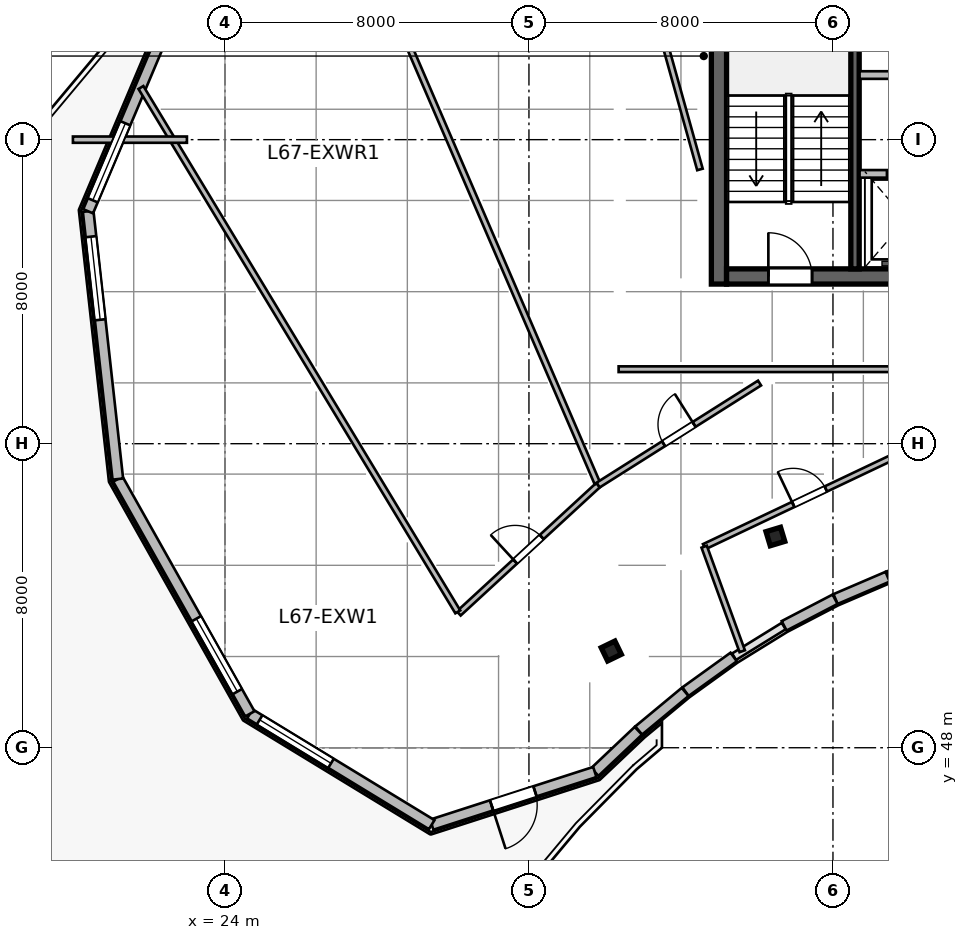
"""IFC4 building model, lengths in metres.
Left out: names, types, materials, properties, quantities, classifications, styles, units other than length and angle.
Written with IfcOpenShell. Run it as: python <this file> out.ifc"""

import sys

from ifc_helpers import new_model, si_unit, direction, frame, frame_2d, origin, origin_2d, place, context, subcontext, project, spatial, rectangle, i_section, extrude, source, transform, mapped, element, fill, save


model = new_model("IFC4")
c1 = context("Model", 3, precision=1e-05, world=origin(), true_north=direction((0.0, 1.0)))
c2 = subcontext(c1, "Body", "Model", "MODEL_VIEW")
j1 = project(units=[si_unit("LENGTHUNIT", "METRE"), si_unit("PLANEANGLEUNIT", "RADIAN")], contexts=[c1])
p1 = place(None, origin())
s1 = spatial("IfcSite", under=j1, at=p1, CompositionType="ELEMENT")
p2 = place(p1, origin())
s2 = spatial("IfcBuilding", under=s1, at=p2, CompositionType="ELEMENT")
p3 = place(p2, frame((0.0, 0.0, 275.7)))
s3 = spatial("IfcBuildingStorey", under=s2, at=p3, CompositionType="ELEMENT", Elevation=275.7)
m1 = source(origin(), c2, "Body", "SweptSolid", [
    extrude(rectangle(XDim=12.0, YDim=0.4, at=frame_2d((6.0, 0.0))), origin(), (0.0, 0.0, 1.0), 3.9),
])
p4 = place(p3, frame((37.0, 60.2, 0.0), z_axis=(0.0, 0.0, 1.0), x_axis=(0.0, 1.0, 0.0)))
e1 = element("IfcWall", 1, at=p4, inside=s3, PredefinedType="SHEAR", context=c2, shape_type="MappedRepresentation", body=[
    mapped(m1, transform((0.0, 0.0, 0.0), scale=1.0)),
])
m2 = source(origin(), c2, "Body", "SweptSolid", [
    extrude(rectangle(XDim=21.6, YDim=0.4, at=frame_2d((10.8, 0.0))), origin(), (0.0, 0.0, 1.0), 3.9),
])
p5 = place(p3, frame((37.2, 60.4, 0.0), z_axis=(0.0, 0.0, 1.0), x_axis=(1.0, 0.0, 0.0)))
e2 = element("IfcWall", 2, at=p5, inside=s3, PredefinedType="SHEAR", context=c2, shape_type="MappedRepresentation", body=[
    mapped(m2, transform((0.0, 0.0, 0.0), scale=1.0)),
])
p6 = place(p5, frame((1.1, 0.0, 0.0)))
e3 = element("IfcOpeningElement", 3, at=p6, cuts=e2, PredefinedType="OPENING", context=c2, shape_type="SweptSolid", body=[
    extrude(rectangle(XDim=1.15, YDim=2.15, at=frame_2d((0.575, 1.075))), frame((0.0, 0.21, 0.0), z_axis=(0.0, -1.0, 0.0), x_axis=(1.0, 0.0, 0.0)), (0.0, 0.0, 1.0), 0.42),
])
p7 = place(p5, frame((19.5, 0.0, 0.0)))
e4 = element("IfcOpeningElement", 4, at=p7, cuts=e2, PredefinedType="OPENING", context=c2, shape_type="SweptSolid", body=[
    extrude(rectangle(XDim=0.9, YDim=2.1, at=frame_2d((0.45, 1.05))), frame((0.0, 0.21, 0.0), z_axis=(0.0, -1.0, 0.0), x_axis=(1.0, 0.0, 0.0)), (0.0, 0.0, 1.0), 0.42),
])
p8 = place(p5, frame((12.02, 0.0, 0.0)))
e5 = element("IfcOpeningElement", 5, at=p8, cuts=e2, PredefinedType="OPENING", context=c2, shape_type="SweptSolid", body=[
    extrude(rectangle(XDim=1.6, YDim=2.15, at=frame_2d((0.8, 1.075))), frame((0.0, 0.21, 0.0), z_axis=(0.0, -1.0, 0.0), x_axis=(1.0, 0.0, 0.0)), (0.0, 0.0, 1.0), 0.42),
])
m3 = source(origin(), c2, "Body", "SweptSolid", [
    extrude(rectangle(XDim=11.2, YDim=0.22, at=frame_2d((5.6, 0.0))), origin(), (0.0, 0.0, 1.0), 3.9),
])
p9 = place(p3, frame((40.58, 60.6, 0.0), z_axis=(0.0, 0.0, 1.0), x_axis=(0.0, 1.0, 0.0)))
e6 = element("IfcWall", 6, at=p9, inside=s3, PredefinedType="SHEAR", context=c2, shape_type="MappedRepresentation", body=[
    mapped(m3, transform((0.0, 0.0, 0.0), scale=1.0)),
])
m4 = source(origin(), c2, "Body", "SweptSolid", [
    extrude(i_section(OverallWidth=0.399, OverallDepth=0.387, WebThickness=0.021, FlangeThickness=0.033, at=origin_2d()), origin(), (0.0, 0.0, 1.0), 3.9),
])
for number, where, z_axis, x_axis in (
    (7, (34.166, 50.545, 0.0), (0.0, 0.0, 1.0), (-0.436, 0.9, 0.0)),
    (8, (38.485, 53.558, 0.0), (0.0, 0.0, 1.0), (-0.289, 0.957, 0.0)),
):
    element("IfcColumn", number, at=place(p3, frame(where, z_axis=z_axis, x_axis=x_axis)), inside=s3, PredefinedType="COLUMN", context=c2, shape_type="MappedRepresentation", body=[
        mapped(m4, transform((0.0, 0.0, 0.0), scale=1.0)),
    ])
m5 = source(origin(), c2, "Body", "SweptSolid", [
    extrude(rectangle(XDim=1.473, YDim=0.28, at=frame_2d((0.736, 0.0))), origin(), (0.0, 0.0, 1.0), 3.64),
])
p10 = place(p3, frame((42.845, 52.979, 0.0), z_axis=(0.0, 0.0, 1.0), x_axis=(-0.946641296917, -0.322289086026, 0.0)))
e9 = element("IfcWall", 9, at=p10, inside=s3, PredefinedType="SOLIDWALL", context=c2, shape_type="MappedRepresentation", body=[
    mapped(m5, transform((0.0, 0.0, 0.0), scale=1.0)),
])
m6 = source(origin(), c2, "Body", "SweptSolid", [
    extrude(rectangle(XDim=1.49, YDim=0.28, at=frame_2d((0.745, 0.0))), origin(), (0.0, 0.0, 1.0), 3.64),
])
p11 = place(p3, frame((41.438, 52.5, 0.0), z_axis=(0.0, 0.0, 1.0), x_axis=(-0.919009427656, -0.394235553799, 0.0)))
e10 = element("IfcWall", 10, at=p11, inside=s3, PredefinedType="SOLIDWALL", context=c2, shape_type="MappedRepresentation", body=[
    mapped(m6, transform((0.0, 0.0, 0.0), scale=1.0)),
])
m7 = source(origin(), c2, "Body", "SweptSolid", [
    extrude(rectangle(XDim=1.512, YDim=0.28, at=frame_2d((0.756, 0.0))), origin(), (0.0, 0.0, 1.0), 3.64),
])
p12 = place(p3, frame((40.056, 51.906, 0.0), z_axis=(0.0, 0.0, 1.0), x_axis=(-0.886841011195, -0.462074691865, 0.0)))
e11 = element("IfcWall", 11, at=p12, inside=s3, PredefinedType="SOLIDWALL", context=c2, shape_type="MappedRepresentation", body=[
    mapped(m7, transform((0.0, 0.0, 0.0), scale=1.0)),
])
m8 = source(origin(), c2, "Body", "SweptSolid", [
    extrude(rectangle(XDim=1.561, YDim=0.28, at=frame_2d((0.781, 0.0))), origin(), (0.0, 0.0, 1.0), 3.64),
])
p13 = place(p3, frame((37.387, 50.387, 0.0), z_axis=(0.0, 0.0, 1.0), x_axis=(-0.81154027425, -0.584296485758, 0.0)))
e12 = element("IfcWall", 12, at=p13, inside=s3, PredefinedType="SOLIDWALL", context=c2, shape_type="MappedRepresentation", body=[
    mapped(m8, transform((0.0, 0.0, 0.0), scale=1.0)),
])
m9 = source(origin(), c2, "Body", "SweptSolid", [
    extrude(rectangle(XDim=1.589, YDim=0.28, at=frame_2d((0.794, 0.0))), origin(), (0.0, 0.0, 1.0), 3.64),
])
p14 = place(p3, frame((36.11, 49.468, 0.0), z_axis=(0.0, 0.0, 1.0), x_axis=(-0.769805836273, -0.63827813251, 0.0)))
e13 = element("IfcWall", 13, at=p14, inside=s3, PredefinedType="SOLIDWALL", context=c2, shape_type="MappedRepresentation", body=[
    mapped(m9, transform((0.0, 0.0, 0.0), scale=1.0)),
])
m10 = source(origin(), c2, "Body", "SweptSolid", [
    extrude(rectangle(XDim=1.577, YDim=0.28, at=frame_2d((0.789, 0.0))), origin(), (0.0, 0.0, 1.0), 3.64),
])
p15 = place(p3, frame((34.878, 48.446, 0.0), z_axis=(0.0, 0.0, 1.0), x_axis=(-0.726119464467, -0.687568558998, 0.0)))
e14 = element("IfcWall", 14, at=p15, inside=s3, PredefinedType="SOLIDWALL", context=c2, shape_type="MappedRepresentation", body=[
    mapped(m10, transform((0.0, 0.0, 0.0), scale=1.0)),
])
m11 = source(origin(), c2, "Body", "SweptSolid", [
    extrude(rectangle(XDim=4.509, YDim=0.28, at=frame_2d((2.255, 0.0))), origin(), (0.0, 0.0, 1.0), 3.64),
])
p16 = place(p3, frame((33.733, 47.361, 0.0), z_axis=(0.0, 0.0, 1.0), x_axis=(-0.95162949292, -0.307247958828, 0.0)))
e15 = element("IfcWall", 15, at=p16, inside=s3, PredefinedType="SOLIDWALL", context=c2, shape_type="MappedRepresentation", body=[
    mapped(m11, transform((0.0, 0.0, 0.0), scale=1.0)),
])
p17 = place(p16, frame((1.655, 0.0, 0.0)))
e16 = element("IfcOpeningElement", 16, at=p17, cuts=e15, PredefinedType="OPENING", context=c2, shape_type="SweptSolid", body=[
    extrude(rectangle(XDim=1.2, YDim=2.2, at=frame_2d((0.6, 1.1))), frame((0.0, 0.15, 0.0), z_axis=(0.0, -1.0, 0.0), x_axis=(1.0, 0.0, 0.0)), (0.0, 0.0, 1.0), 0.3),
])
m12 = source(origin(), c2, "Body", "SweptSolid", [
    extrude(rectangle(XDim=5.604, YDim=0.28, at=frame_2d((2.802, 0.0))), origin(), (0.0, 0.0, 1.0), 3.64),
])
p18 = place(p3, frame((29.442, 45.976, 0.0), z_axis=(0.0, 0.0, 1.0), x_axis=(-0.854002492971, 0.520268913158, 0.0)))
e17 = element("IfcWall", 17, at=p18, inside=s3, PredefinedType="SOLIDWALL", context=c2, shape_type="MappedRepresentation", body=[
    mapped(m12, transform((0.0, 0.0, 0.0), scale=1.0)),
])
p19 = place(p18, frame((3.103, 0.0, 0.95)))
e18 = element("IfcOpeningElement", 18, at=p19, cuts=e17, PredefinedType="OPENING", context=c2, shape_type="SweptSolid", body=[
    extrude(rectangle(XDim=2.2, YDim=2.1, at=frame_2d((1.1, 1.05))), frame((0.0, 0.15, 0.0), z_axis=(0.0, -1.0, 0.0), x_axis=(1.0, 0.0, 0.0)), (0.0, 0.0, 1.0), 0.3),
])
m13 = source(origin(), c2, "Body", "SweptSolid", [
    extrude(rectangle(XDim=7.087, YDim=0.28, at=frame_2d((3.543, 0.0))), origin(), (0.0, 0.0, 1.0), 3.64),
])
p20 = place(p3, frame((24.656, 48.892, 0.0), z_axis=(0.0, 0.0, 1.0), x_axis=(-0.490158199368, 0.871633489256, 0.0)))
e19 = element("IfcWall", 19, at=p20, inside=s3, PredefinedType="SOLIDWALL", context=c2, shape_type="MappedRepresentation", body=[
    mapped(m13, transform((0.0, 0.0, 0.0), scale=1.0)),
])
p21 = place(p20, frame((0.672, 0.0, 0.95)))
e20 = element("IfcOpeningElement", 20, at=p21, cuts=e19, PredefinedType="OPENING", context=c2, shape_type="SweptSolid", body=[
    extrude(rectangle(XDim=2.2, YDim=2.1, at=frame_2d((1.1, 1.05))), frame((0.0, 0.15, 0.0), z_axis=(0.0, -1.0, 0.0), x_axis=(1.0, 0.0, 0.0)), (0.0, 0.0, 1.0), 0.3),
])
m14 = source(origin(), c2, "Body", "SweptSolid", [
    extrude(rectangle(XDim=7.09, YDim=0.28, at=frame_2d((3.545, 0.0))), origin(), (0.0, 0.0, 1.0), 3.64),
])
p22 = place(p3, frame((21.182, 55.069, 0.0), z_axis=(0.0, 0.0, 1.0), x_axis=(-0.110159396922, 0.993913933532, 0.0)))
e21 = element("IfcWall", 21, at=p22, inside=s3, PredefinedType="SOLIDWALL", context=c2, shape_type="MappedRepresentation", body=[
    mapped(m14, transform((0.0, 0.0, 0.0), scale=1.0)),
])
p23 = place(p22, frame((4.217, 0.0, 0.95)))
e22 = element("IfcOpeningElement", 22, at=p23, cuts=e21, PredefinedType="OPENING", context=c2, shape_type="SweptSolid", body=[
    extrude(rectangle(XDim=2.2, YDim=2.1, at=frame_2d((1.1, 1.05))), frame((0.0, 0.15, 0.0), z_axis=(0.0, -1.0, 0.0), x_axis=(1.0, 0.0, 0.0)), (0.0, 0.0, 1.0), 0.3),
])
m15 = source(origin(), c2, "Body", "SweptSolid", [
    extrude(rectangle(XDim=5.655, YDim=0.28, at=frame_2d((2.828, 0.0))), origin(), (0.0, 0.0, 1.0), 3.64),
])
p24 = place(p3, frame((20.401, 62.116, 0.0), z_axis=(0.0, 0.0, 1.0), x_axis=(0.389585063528, 0.920990487614, 0.0)))
e23 = element("IfcWall", 23, at=p24, inside=s3, PredefinedType="SOLIDWALL", context=c2, shape_type="MappedRepresentation", body=[
    mapped(m15, transform((0.0, 0.0, 0.0), scale=1.0)),
])
p25 = place(p24, frame((0.314, 0.0, 0.95)))
e24 = element("IfcOpeningElement", 24, at=p25, cuts=e23, PredefinedType="OPENING", context=c2, shape_type="SweptSolid", body=[
    extrude(rectangle(XDim=2.2, YDim=2.1, at=frame_2d((1.1, 1.05))), frame((0.0, 0.15, 0.0), z_axis=(0.0, -1.0, 0.0), x_axis=(1.0, 0.0, 0.0)), (0.0, 0.0, 1.0), 0.3),
])
m16 = source(origin(), c2, "Body", "SweptSolid", [
    extrude(rectangle(XDim=8.02, YDim=0.2, at=frame_2d((4.01, 0.0))), origin(), (0.0, 0.0, 1.0), 3.64),
])
p26 = place(p3, frame((40.7, 63.1, 0.0), z_axis=(0.0, 0.0, 1.0), x_axis=(1.0, 0.0, 0.0)))
e25 = element("IfcWall", 25, at=p26, inside=s3, PredefinedType="SOLIDWALL", context=c2, shape_type="MappedRepresentation", body=[
    mapped(m16, transform((0.0, 0.0, 0.0), scale=1.0)),
])
p27 = place(p26, frame((0.72, 0.0, 0.0)))
e26 = element("IfcOpeningElement", 26, at=p27, cuts=e25, PredefinedType="OPENING", context=c2, shape_type="SweptSolid", body=[
    extrude(rectangle(XDim=1.0, YDim=2.15, at=frame_2d((0.5, 1.075))), frame((0.0, 0.11, 0.0), z_axis=(0.0, -1.0, 0.0), x_axis=(1.0, 0.0, 0.0)), (0.0, 0.0, 1.0), 0.22),
])
p28 = place(p26, frame((2.62, 0.0, 0.0)))
e27 = element("IfcOpeningElement", 27, at=p28, cuts=e25, PredefinedType="OPENING", context=c2, shape_type="SweptSolid", body=[
    extrude(rectangle(XDim=1.0, YDim=2.15, at=frame_2d((0.5, 1.075))), frame((0.0, 0.11, 0.0), z_axis=(0.0, -1.0, 0.0), x_axis=(1.0, 0.0, 0.0)), (0.0, 0.0, 1.0), 0.22),
])
p29 = place(p26, frame((4.55, 0.0, 0.0)))
e28 = element("IfcOpeningElement", 28, at=p29, cuts=e25, PredefinedType="OPENING", context=c2, shape_type="SweptSolid", body=[
    extrude(rectangle(XDim=1.0, YDim=2.15, at=frame_2d((0.5, 1.075))), frame((0.0, 0.11, 0.0), z_axis=(0.0, -1.0, 0.0), x_axis=(1.0, 0.0, 0.0)), (0.0, 0.0, 1.0), 0.22),
])
p30 = place(p26, frame((6.55, 0.0, 0.0)))
e29 = element("IfcOpeningElement", 29, at=p30, cuts=e25, PredefinedType="OPENING", context=c2, shape_type="SweptSolid", body=[
    extrude(rectangle(XDim=1.0, YDim=2.15, at=frame_2d((0.5, 1.075))), frame((0.0, 0.11, 0.0), z_axis=(0.0, -1.0, 0.0), x_axis=(1.0, 0.0, 0.0)), (0.0, 0.0, 1.0), 0.22),
])
m17 = source(origin(), c2, "Body", "SweptSolid", [
    extrude(rectangle(XDim=8.8, YDim=0.2, at=frame_2d((4.4, 0.0))), origin(), (0.0, 0.0, 1.0), 3.64),
])
p31 = place(p3, frame((40.7, 65.7, 0.0), z_axis=(0.0, 0.0, 1.0), x_axis=(1.0, 0.0, 0.0)))
e30 = element("IfcWall", 30, at=p31, inside=s3, PredefinedType="SOLIDWALL", context=c2, shape_type="MappedRepresentation", body=[
    mapped(m17, transform((0.0, 0.0, 0.0), scale=1.0)),
])
p32 = place(p31, frame((3.8, 0.0, 0.0)))
e31 = element("IfcOpeningElement", 31, at=p32, cuts=e30, PredefinedType="OPENING", context=c2, shape_type="SweptSolid", body=[
    extrude(rectangle(XDim=0.95, YDim=2.15, at=frame_2d((0.475, 1.075))), frame((0.0, 0.11, 0.0), z_axis=(0.0, -1.0, 0.0), x_axis=(1.0, 0.0, 0.0)), (0.0, 0.0, 1.0), 0.22),
])
m18 = source(origin(), c2, "Body", "SweptSolid", [
    extrude(rectangle(XDim=6.137, YDim=0.15, at=frame_2d((3.069, 0.0))), origin(), (0.0, 0.0, 1.0), 3.64),
])
p33 = place(p3, frame((36.611, 53.29, 0.0), z_axis=(0.0, 0.0, 1.0), x_axis=(0.903442784804, 0.428708682657, 0.0)))
e32 = element("IfcWall", 32, at=p33, inside=s3, PredefinedType="PARTITIONING", context=c2, shape_type="MappedRepresentation", body=[
    mapped(m18, transform((0.0, 0.0, 0.0), scale=1.0)),
])
p34 = place(p33, frame((2.594, 0.0, 0.0)))
e33 = element("IfcOpeningElement", 33, at=p34, cuts=e32, PredefinedType="OPENING", context=c2, shape_type="SweptSolid", body=[
    extrude(rectangle(XDim=0.95, YDim=2.1, at=frame_2d((0.475, 1.05))), frame((0.0, 0.085, 0.0), z_axis=(0.0, -1.0, 0.0), x_axis=(1.0, 0.0, 0.0)), (0.0, 0.0, 1.0), 0.17),
])
m19 = source(origin(), c2, "Body", "SweptSolid", [
    extrude(rectangle(XDim=2.927, YDim=0.15, at=frame_2d((1.464, 0.0))), origin(), (0.0, 0.0, 1.0), 3.64),
])
p35 = place(p3, frame((37.612, 50.539, 0.0), z_axis=(0.0, 0.0, 1.0), x_axis=(-0.342030996507, 0.93968867048, 0.0)))
e34 = element("IfcWall", 34, at=p35, inside=s3, PredefinedType="PARTITIONING", context=c2, shape_type="MappedRepresentation", body=[
    mapped(m19, transform((0.0, 0.0, 0.0), scale=1.0)),
])
m20 = source(origin(), c2, "Body", "SweptSolid", [
    extrude(rectangle(XDim=4.986, YDim=0.15, at=frame_2d((2.493, 0.0))), origin(), (0.0, 0.0, 1.0), 3.64),
])
p36 = place(p3, frame((30.153, 51.533, 0.0), z_axis=(0.0, 0.0, 1.0), x_axis=(0.735595190169, 0.677421372707, 0.0)))
e35 = element("IfcWall", 35, at=p36, inside=s3, PredefinedType="PARTITIONING", context=c2, shape_type="MappedRepresentation", body=[
    mapped(m20, transform((0.0, 0.0, 0.0), scale=1.0)),
])
p37 = place(p36, frame((2.018, 0.0, 0.0)))
e36 = element("IfcOpeningElement", 36, at=p37, cuts=e35, PredefinedType="OPENING", context=c2, shape_type="SweptSolid", body=[
    extrude(rectangle(XDim=0.95, YDim=2.1, at=frame_2d((0.475, 1.05))), frame((0.0, 0.085, 0.0), z_axis=(0.0, -1.0, 0.0), x_axis=(1.0, 0.0, 0.0)), (0.0, 0.0, 1.0), 0.17),
])
m21 = source(origin(), c2, "Body", "SweptSolid", [
    extrude(rectangle(XDim=16.121, YDim=0.15, at=frame_2d((8.061, 0.0))), origin(), (0.0, 0.0, 1.0), 3.64),
])
p38 = place(p3, frame((30.127, 51.575, 0.0), z_axis=(0.0, 0.0, 1.0), x_axis=(-0.517212483904, 0.855857024563, 0.0)))
e37 = element("IfcWall", 37, at=p38, inside=s3, PredefinedType="PARTITIONING", context=c2, shape_type="MappedRepresentation", body=[
    mapped(m21, transform((0.0, 0.0, 0.0), scale=1.0)),
])
m22 = source(origin(), c2, "Body", "SweptSolid", [
    extrude(rectangle(XDim=17.556, YDim=0.15, at=frame_2d((8.778, 0.0))), origin(), (0.0, 0.0, 1.0), 3.64),
])
p39 = place(p3, frame((33.8, 54.958, 0.0), z_axis=(0.0, 0.0, 1.0), x_axis=(-0.395687598313, 0.918385172213, 0.0)))
e38 = element("IfcWall", 38, at=p39, inside=s3, PredefinedType="PARTITIONING", context=c2, shape_type="MappedRepresentation", body=[
    mapped(m22, transform((0.0, 0.0, 0.0), scale=1.0)),
])
m23 = source(origin(), c2, "Body", "SweptSolid", [
    extrude(rectangle(XDim=5.025, YDim=0.15, at=frame_2d((2.513, 0.0))), origin(), (0.0, 0.0, 1.0), 3.64),
])
p40 = place(p3, frame((33.82, 54.911, 0.0), z_axis=(0.0, 0.0, 1.0), x_axis=(0.84532378062, 0.534254345717, 0.0)))
e39 = element("IfcWall", 39, at=p40, inside=s3, PredefinedType="PARTITIONING", context=c2, shape_type="MappedRepresentation", body=[
    mapped(m23, transform((0.0, 0.0, 0.0), scale=1.0)),
])
p41 = place(p40, frame((2.038, 0.0, 0.0)))
e40 = element("IfcOpeningElement", 40, at=p41, cuts=e39, PredefinedType="OPENING", context=c2, shape_type="SweptSolid", body=[
    extrude(rectangle(XDim=0.95, YDim=2.1, at=frame_2d((0.475, 1.05))), frame((0.0, 0.085, 0.0), z_axis=(0.0, -1.0, 0.0), x_axis=(1.0, 0.0, 0.0)), (0.0, 0.0, 1.0), 0.17),
])
m24 = source(origin(), c2, "Body", "SweptSolid", [
    extrude(rectangle(XDim=12.311, YDim=0.15, at=frame_2d((6.155, 0.0))), origin(), (0.0, 0.0, 1.0), 3.64),
])
p42 = place(p3, frame((36.5, 63.216, 0.0), z_axis=(0.0, 0.0, 1.0), x_axis=(-0.268759602651, 0.963207286093, 0.0)))
e41 = element("IfcWall", 41, at=p42, inside=s3, PredefinedType="PARTITIONING", context=c2, shape_type="MappedRepresentation", body=[
    mapped(m24, transform((0.0, 0.0, 0.0), scale=1.0)),
])
m25 = source(origin(), c2, "Body", "SweptSolid", [
    extrude(rectangle(XDim=12.39, YDim=0.15, at=frame_2d((6.195, 0.0))), origin(), (0.0, 0.0, 1.0), 3.27),
])
p43 = place(p3, frame((34.36, 57.96, 0.0), z_axis=(0.0, 0.0, 1.0), x_axis=(1.0, 0.0, 0.0)))
e42 = element("IfcWall", 42, at=p43, inside=s3, PredefinedType="PARTITIONING", context=c2, shape_type="MappedRepresentation", body=[
    mapped(m25, transform((0.0, 0.0, 0.0), scale=1.0)),
])
m26 = source(origin(), c2, "Body", "SweptSolid", [
    extrude(rectangle(XDim=3.0, YDim=0.165, at=frame_2d((1.5, 0.0))), origin(), (0.0, 0.0, 1.0), 0.65),
])
p44 = place(p3, frame((20.0, 64.0, 0.0), z_axis=(0.0, 0.0, 1.0), x_axis=(1.0, 0.0, 0.0)))
e43 = element("IfcWall", 43, at=p44, inside=s3, PredefinedType="PARAPET", context=c2, shape_type="MappedRepresentation", body=[
    mapped(m26, transform((0.0, 0.0, 0.0), scale=1.0)),
])
m27 = source(origin(), c2, "Body", "SweptSolid", [
    extrude(rectangle(XDim=1.2, YDim=2.2, at=frame_2d((0.6, 1.1))), frame((0.0, 0.025, 0.0), z_axis=(0.0, -1.0, 0.0), x_axis=(1.0, 0.0, 0.0)), (0.0, 0.0, 1.0), 0.05),
])
p45 = place(p17, origin())
e44 = element("IfcDoor", 44, at=p45, inside=s3, OperationType="SINGLE_SWING_RIGHT", PredefinedType="DOOR", context=c2, shape_type="MappedRepresentation", body=[
    mapped(m27, transform((0.0, 0.0, 0.0), scale=1.0)),
])
fill(e16, e44)
m28 = source(origin(), c2, "Body", "SweptSolid", [
    extrude(rectangle(XDim=2.2, YDim=2.1, at=frame_2d((1.1, 1.05))), frame((0.0, 0.03, 0.0), z_axis=(0.0, -1.0, 0.0), x_axis=(1.0, 0.0, 0.0)), (0.0, 0.0, 1.0), 0.06),
])
p46 = place(p19, origin())
e45 = element("IfcWindow", 45, at=p46, inside=s3, PartitioningType="TRIPLE_PANEL_VERTICAL", PredefinedType="WINDOW", context=c2, shape_type="MappedRepresentation", body=[
    mapped(m28, transform((0.0, 0.0, 0.0), scale=1.0)),
])
fill(e18, e45)
p47 = place(p21, origin())
e46 = element("IfcWindow", 46, at=p47, inside=s3, PartitioningType="TRIPLE_PANEL_VERTICAL", PredefinedType="WINDOW", context=c2, shape_type="MappedRepresentation", body=[
    mapped(m28, transform((0.0, 0.0, 0.0), scale=1.0)),
])
fill(e20, e46)
p48 = place(p23, origin())
e47 = element("IfcWindow", 47, at=p48, inside=s3, PartitioningType="TRIPLE_PANEL_VERTICAL", PredefinedType="WINDOW", context=c2, shape_type="MappedRepresentation", body=[
    mapped(m28, transform((0.0, 0.0, 0.0), scale=1.0)),
])
fill(e22, e47)
p49 = place(p25, origin())
e48 = element("IfcWindow", 48, at=p49, inside=s3, PartitioningType="TRIPLE_PANEL_VERTICAL", PredefinedType="WINDOW", context=c2, shape_type="MappedRepresentation", body=[
    mapped(m28, transform((0.0, 0.0, 0.0), scale=1.0)),
])
fill(e24, e48)
m29 = source(origin(), c2, "Body", "SweptSolid", [
    extrude(rectangle(XDim=1.15, YDim=2.15, at=frame_2d((0.575, 1.075))), frame((0.0, 0.025, 0.0), z_axis=(0.0, -1.0, 0.0), x_axis=(1.0, 0.0, 0.0)), (0.0, 0.0, 1.0), 0.05),
])
p50 = place(p6, origin())
e49 = element("IfcDoor", 49, at=p50, inside=s3, OperationType="SINGLE_SWING_LEFT", PredefinedType="DOOR", context=c2, shape_type="MappedRepresentation", body=[
    mapped(m29, transform((0.0, 0.0, 0.0), scale=1.0)),
])
fill(e3, e49)
m30 = source(origin(), c2, "Body", "SweptSolid", [
    extrude(rectangle(XDim=1.0, YDim=2.15, at=frame_2d((0.5, 1.075))), frame((0.0, 0.025, 0.0), z_axis=(0.0, -1.0, 0.0), x_axis=(1.0, 0.0, 0.0)), (0.0, 0.0, 1.0), 0.05),
])
p51 = place(p27, origin())
e50 = element("IfcDoor", 50, at=p51, inside=s3, OperationType="DOUBLE_DOOR_SLIDING", PredefinedType="DOOR", context=c2, shape_type="MappedRepresentation", body=[
    mapped(m30, transform((0.0, 0.0, 0.0), scale=1.0)),
])
fill(e26, e50)
m31 = source(origin(), c2, "Body", "SweptSolid", [
    extrude(rectangle(XDim=0.95, YDim=2.1, at=frame_2d((0.475, 1.05))), frame((0.0, 0.025, 0.0), z_axis=(0.0, -1.0, 0.0), x_axis=(1.0, 0.0, 0.0)), (0.0, 0.0, 1.0), 0.05),
])
p52 = place(p34, origin())
e51 = element("IfcDoor", 51, at=p52, inside=s3, OperationType="SINGLE_SWING_LEFT", PredefinedType="DOOR", context=c2, shape_type="MappedRepresentation", body=[
    mapped(m31, transform((0.0, 0.0, 0.0), scale=1.0)),
])
fill(e33, e51)
p53 = place(p37, origin())
e52 = element("IfcDoor", 52, at=p53, inside=s3, OperationType="SINGLE_SWING_LEFT", PredefinedType="DOOR", context=c2, shape_type="MappedRepresentation", body=[
    mapped(m31, transform((0.0, 0.0, 0.0), scale=1.0)),
])
fill(e36, e52)
p54 = place(p41, origin())
e53 = element("IfcDoor", 53, at=p54, inside=s3, OperationType="SINGLE_SWING_RIGHT", PredefinedType="DOOR", context=c2, shape_type="MappedRepresentation", body=[
    mapped(m31, transform((0.0, 0.0, 0.0), scale=1.0)),
])
fill(e40, e53)
save(model, sys.argv[1])
